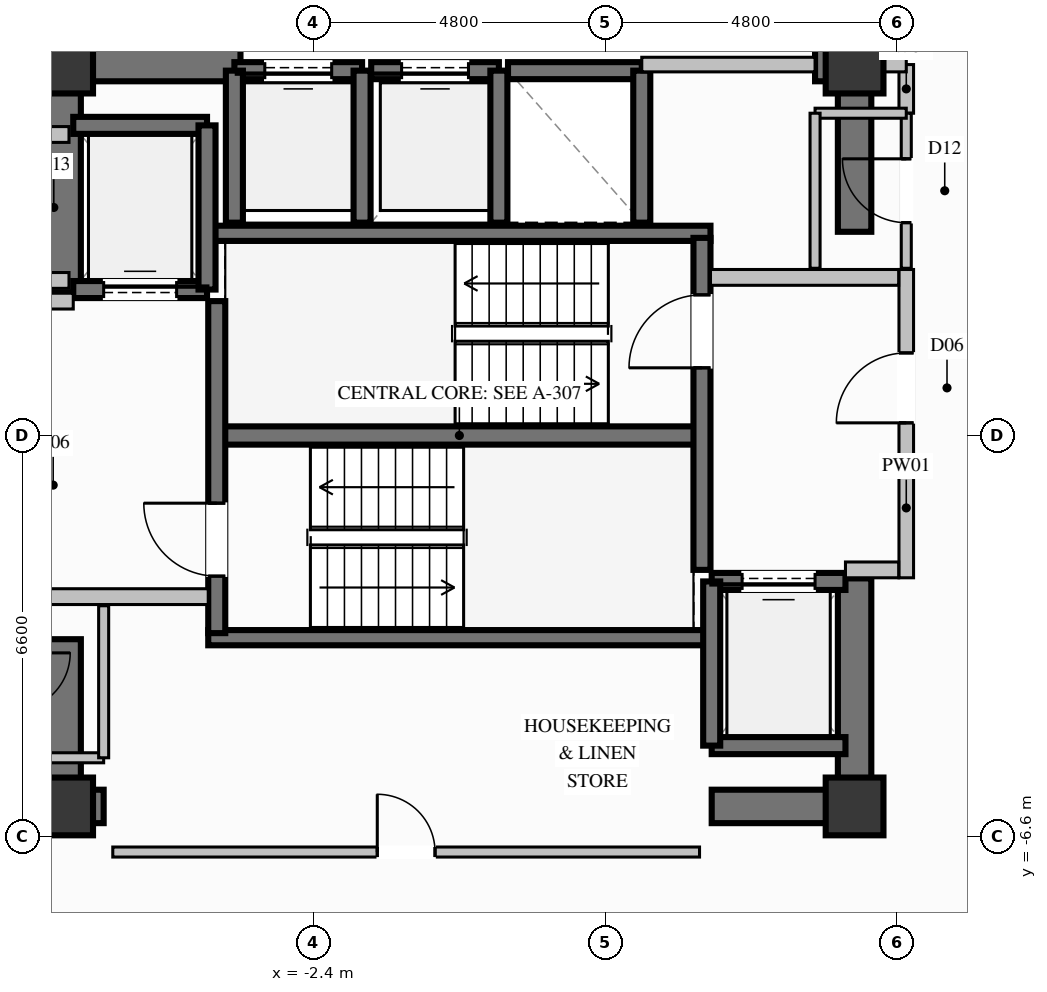
"""IFC4 building model, lengths in metres.
Left out: names, types, materials, properties, quantities, classifications, styles, units other than length and angle.
Written with IfcOpenShell. Run it as: python <this file> out.ifc"""

import sys

from ifc_helpers import new_model, si_unit, direction, frame, frame_2d, origin, origin_2d, place, context, subcontext, project, spatial, rectangle, extrude, element, fill, save


model = new_model("IFC4")
c1 = context("Model", 3, precision=1e-05, world=origin(), true_north=direction((0.0, 1.0)))
c2 = subcontext(c1, "Body", "Model", "MODEL_VIEW")
j1 = project(units=[si_unit("LENGTHUNIT", "METRE"), si_unit("PLANEANGLEUNIT", "RADIAN")], contexts=[c1])
p1 = place(None, origin())
s1 = spatial("IfcSite", under=j1, at=p1, CompositionType="ELEMENT")
p2 = place(p1, origin())
s2 = spatial("IfcBuilding", under=s1, at=p2, CompositionType="ELEMENT")
p3 = place(p2, frame((0.0, 0.0, 198.4)))
s3 = spatial("IfcBuildingStorey", under=s2, at=p3, CompositionType="ELEMENT", Elevation=198.4)
for number, where, z_axis, x_axis in (
    (1, (-6.5, -6.1, 0.0), (0.0, 0.0, 1.0), (1.0, 0.0, 0.0)),
    (2, (6.5, -6.1, 0.0), (0.0, 0.0, 1.0), (1.0, 0.0, 0.0)),
    (3, (6.5, 6.1, 0.0), (0.0, 0.0, 1.0), (1.0, 0.0, 0.0)),
    (4, (-6.5, 6.1, 0.0), (0.0, 0.0, 1.0), (1.0, 0.0, 0.0)),
):
    element("IfcColumn", number, at=place(p3, frame(where, z_axis=z_axis, x_axis=x_axis)), inside=s3, PredefinedType="COLUMN", context=c2, shape_type="SweptSolid", body=[
        extrude(rectangle(XDim=0.95, YDim=0.95, at=origin_2d()), origin(), (0.0, 0.0, 1.0), 3.6),
    ])
p4 = place(p3, frame((-3.99, 0.0, 0.0), z_axis=(0.0, 0.0, 1.0), x_axis=(1.0, 0.0, 0.0)))
e5 = element("IfcWall", 5, at=p4, inside=s3, PredefinedType="SHEAR", context=c2, shape_type="SweptSolid", body=[
    extrude(rectangle(XDim=7.98, YDim=0.3, at=frame_2d((3.99, 0.0))), origin(), (0.0, 0.0, 1.0), 3.6),
])
for number, where, z_axis, x_axis in (
    (6, (-4.13, -3.325, 0.0), (0.0, 0.0, 1.0), (1.0, 0.0, 0.0)),
    (7, (-4.13, 3.325, 0.0), (0.0, 0.0, 1.0), (1.0, 0.0, 0.0)),
):
    element("IfcWall", number, at=place(p3, frame(where, z_axis=z_axis, x_axis=x_axis)), inside=s3, PredefinedType="SOLIDWALL", context=c2, shape_type="SweptSolid", body=[
        extrude(rectangle(XDim=8.26, YDim=0.25, at=frame_2d((4.13, 0.0))), origin(), (0.0, 0.0, 1.0), 3.6),
    ])
p5 = place(p3, frame((-6.225, -6.1, 0.0), z_axis=(0.0, 0.0, 1.0), x_axis=(1.0, 0.0, 0.0)))
e8 = element("IfcWall", 8, at=p5, inside=s3, PredefinedType="SHEAR", context=c2, shape_type="SweptSolid", body=[
    extrude(rectangle(XDim=0.375, YDim=0.55, at=frame_2d((0.188, 0.0))), origin(), (0.0, 0.0, 1.0), 3.6),
])
p6 = place(p3, frame((4.15, -6.1, 0.0), z_axis=(0.0, 0.0, 1.0), x_axis=(1.0, 0.0, 0.0)))
e9 = element("IfcWall", 9, at=p6, inside=s3, PredefinedType="SHEAR", context=c2, shape_type="SweptSolid", body=[
    extrude(rectangle(XDim=2.075, YDim=0.55, at=frame_2d((1.038, 0.0))), origin(), (0.0, 0.0, 1.0), 3.6),
])
p7 = place(p3, frame((-6.225, 6.1, 0.0), z_axis=(0.0, 0.0, 1.0), x_axis=(1.0, 0.0, 0.0)))
e10 = element("IfcWall", 10, at=p7, inside=s3, PredefinedType="SHEAR", context=c2, shape_type="SweptSolid", body=[
    extrude(rectangle(XDim=2.625, YDim=0.55, at=frame_2d((1.312, 0.0))), origin(), (0.0, 0.0, 1.0), 3.6),
])
p8 = place(p3, frame((5.85, 6.1, 0.0), z_axis=(0.0, 0.0, 1.0), x_axis=(1.0, 0.0, 0.0)))
e11 = element("IfcWall", 11, at=p8, inside=s3, PredefinedType="SHEAR", context=c2, shape_type="SweptSolid", body=[
    extrude(rectangle(XDim=0.375, YDim=0.55, at=frame_2d((0.188, 0.0))), origin(), (0.0, 0.0, 1.0), 3.6),
])
p9 = place(p3, frame((-6.5, 2.35, 0.0), z_axis=(0.0, 0.0, 1.0), x_axis=(0.0, 1.0, 0.0)))
e12 = element("IfcWall", 12, at=p9, inside=s3, PredefinedType="SHEAR", context=c2, shape_type="SweptSolid", body=[
    extrude(rectangle(XDim=4.025, YDim=0.55, at=frame_2d((2.012, 0.0))), origin(), (0.0, 0.0, 1.0), 3.6),
])
p10 = place(p3, frame((-6.5, -6.375, 0.0), z_axis=(0.0, 0.0, 1.0), x_axis=(0.0, 1.0, 0.0)))
e13 = element("IfcWall", 13, at=p10, inside=s3, PredefinedType="SHEAR", context=c2, shape_type="SweptSolid", body=[
    extrude(rectangle(XDim=3.025, YDim=0.55, at=frame_2d((1.512, 0.0))), origin(), (0.0, 0.0, 1.0), 3.6),
])
p11 = place(p3, frame((6.5, -6.375, 0.0), z_axis=(0.0, 0.0, 1.0), x_axis=(0.0, 1.0, 0.0)))
e14 = element("IfcWall", 14, at=p11, inside=s3, PredefinedType="SHEAR", context=c2, shape_type="SweptSolid", body=[
    extrude(rectangle(XDim=4.025, YDim=0.55, at=frame_2d((2.012, 0.0))), origin(), (0.0, 0.0, 1.0), 3.6),
])
p12 = place(p3, frame((6.5, 3.35, 0.0), z_axis=(0.0, 0.0, 1.0), x_axis=(0.0, 1.0, 0.0)))
e15 = element("IfcWall", 15, at=p12, inside=s3, PredefinedType="SHEAR", context=c2, shape_type="SweptSolid", body=[
    extrude(rectangle(XDim=3.025, YDim=0.55, at=frame_2d((1.512, 0.0))), origin(), (0.0, 0.0, 1.0), 3.6),
])
p13 = place(p3, frame((-1.6, 6.0, 0.0), z_axis=(0.0, 0.0, 1.0), x_axis=(-1.0, 0.0, 0.0)))
e16 = element("IfcWall", 16, at=p13, inside=s3, PredefinedType="SOLIDWALL", context=c2, shape_type="SweptSolid", body=[
    extrude(rectangle(XDim=2.1, YDim=0.28, at=frame_2d((1.05, 0.0))), origin(), (0.0, 0.0, 1.0), 3.36),
])
p14 = place(p13, frame((0.5, 0.0, 0.0)))
e17 = element("IfcOpeningElement", 17, at=p14, cuts=e16, PredefinedType="OPENING", context=c2, shape_type="SweptSolid", body=[
    extrude(rectangle(XDim=1.1, YDim=2.2, at=frame_2d((0.55, 1.1))), frame((0.0, 0.15, 0.0), z_axis=(0.0, -1.0, 0.0), x_axis=(1.0, 0.0, 0.0)), (0.0, 0.0, 1.0), 0.3),
])
for number, where, z_axis, x_axis in (
    (18, (-3.7, 6.0, 0.0), (0.0, 0.0, 1.0), (0.0, -1.0, 0.0)),
    (19, (-1.6, 3.5, 0.0), (0.0, 0.0, 1.0), (0.0, 1.0, 0.0)),
):
    element("IfcWall", number, at=place(p3, frame(where, z_axis=z_axis, x_axis=x_axis)), inside=s3, PredefinedType="SOLIDWALL", context=c2, shape_type="SweptSolid", body=[
        extrude(rectangle(XDim=2.5, YDim=0.28, at=frame_2d((1.25, 0.0))), origin(), (0.0, 0.0, 1.0), 3.36),
    ])
p15 = place(p3, frame((0.65, 6.0, 0.0), z_axis=(0.0, 0.0, 1.0), x_axis=(-1.0, 0.0, 0.0)))
e20 = element("IfcWall", 20, at=p15, inside=s3, PredefinedType="SOLIDWALL", context=c2, shape_type="SweptSolid", body=[
    extrude(rectangle(XDim=2.1, YDim=0.28, at=frame_2d((1.05, 0.0))), origin(), (0.0, 0.0, 1.0), 3.36),
])
p16 = place(p15, frame((0.5, 0.0, 0.0)))
e21 = element("IfcOpeningElement", 21, at=p16, cuts=e20, PredefinedType="OPENING", context=c2, shape_type="SweptSolid", body=[
    extrude(rectangle(XDim=1.1, YDim=2.2, at=frame_2d((0.55, 1.1))), frame((0.0, 0.15, 0.0), z_axis=(0.0, -1.0, 0.0), x_axis=(1.0, 0.0, 0.0)), (0.0, 0.0, 1.0), 0.3),
])
p17 = place(p3, frame((0.65, 3.5, 0.0), z_axis=(0.0, 0.0, 1.0), x_axis=(0.0, 1.0, 0.0)))
e22 = element("IfcWall", 22, at=p17, inside=s3, PredefinedType="SOLIDWALL", context=c2, shape_type="SweptSolid", body=[
    extrude(rectangle(XDim=2.5, YDim=0.28, at=frame_2d((1.25, 0.0))), origin(), (0.0, 0.0, 1.0), 3.36),
])
p18 = place(p3, frame((3.0, 6.0, 0.0), z_axis=(0.0, 0.0, 1.0), x_axis=(-1.0, 0.0, 0.0)))
e23 = element("IfcWall", 23, at=p18, inside=s3, PredefinedType="SOLIDWALL", context=c2, shape_type="SweptSolid", body=[
    extrude(rectangle(XDim=2.2, YDim=0.28, at=frame_2d((1.1, 0.0))), origin(), (0.0, 0.0, 1.0), 3.36),
])
p19 = place(p3, frame((3.0, 3.5, 0.0), z_axis=(0.0, 0.0, 1.0), x_axis=(0.0, 1.0, 0.0)))
e24 = element("IfcWall", 24, at=p19, inside=s3, PredefinedType="SOLIDWALL", context=c2, shape_type="SweptSolid", body=[
    extrude(rectangle(XDim=2.5, YDim=0.28, at=frame_2d((1.25, 0.0))), origin(), (0.0, 0.0, 1.0), 3.36),
])
p20 = place(p3, frame((-6.35, 2.4, 0.0), z_axis=(0.0, 0.0, 1.0), x_axis=(1.0, 0.0, 0.0)))
e25 = element("IfcWall", 25, at=p20, inside=s3, PredefinedType="SOLIDWALL", context=c2, shape_type="SweptSolid", body=[
    extrude(rectangle(XDim=2.2, YDim=0.28, at=frame_2d((1.1, 0.0))), origin(), (0.0, 0.0, 1.0), 3.36),
])
p21 = place(p20, frame((0.5, 0.0, 0.0)))
e26 = element("IfcOpeningElement", 26, at=p21, cuts=e25, PredefinedType="OPENING", context=c2, shape_type="SweptSolid", body=[
    extrude(rectangle(XDim=1.2, YDim=2.2, at=frame_2d((0.6, 1.1))), frame((0.0, 0.15, 0.0), z_axis=(0.0, -1.0, 0.0), x_axis=(1.0, 0.0, 0.0)), (0.0, 0.0, 1.0), 0.3),
])
p22 = place(p3, frame((-4.15, 5.1, 0.0), z_axis=(0.0, 0.0, 1.0), x_axis=(-1.0, 0.0, 0.0)))
e27 = element("IfcWall", 27, at=p22, inside=s3, PredefinedType="SOLIDWALL", context=c2, shape_type="SweptSolid", body=[
    extrude(rectangle(XDim=2.2, YDim=0.28, at=frame_2d((1.1, 0.0))), origin(), (0.0, 0.0, 1.0), 3.36),
])
p23 = place(p3, frame((-4.15, 2.4, 0.0), z_axis=(0.0, 0.0, 1.0), x_axis=(0.0, 1.0, 0.0)))
e28 = element("IfcWall", 28, at=p23, inside=s3, PredefinedType="SOLIDWALL", context=c2, shape_type="SweptSolid", body=[
    extrude(rectangle(XDim=2.7, YDim=0.28, at=frame_2d((1.35, 0.0))), origin(), (0.0, 0.0, 1.0), 3.36),
])
p24 = place(p3, frame((4.15, -5.1, 0.0), z_axis=(0.0, 0.0, 1.0), x_axis=(1.0, 0.0, 0.0)))
e29 = element("IfcWall", 29, at=p24, inside=s3, PredefinedType="SOLIDWALL", context=c2, shape_type="SweptSolid", body=[
    extrude(rectangle(XDim=2.2, YDim=0.28, at=frame_2d((1.1, 0.0))), origin(), (0.0, 0.0, 1.0), 3.36),
])
p25 = place(p3, frame((6.35, -2.4, 0.0), z_axis=(0.0, 0.0, 1.0), x_axis=(-1.0, 0.0, 0.0)))
e30 = element("IfcWall", 30, at=p25, inside=s3, PredefinedType="SOLIDWALL", context=c2, shape_type="SweptSolid", body=[
    extrude(rectangle(XDim=2.2, YDim=0.28, at=frame_2d((1.1, 0.0))), origin(), (0.0, 0.0, 1.0), 3.36),
])
p26 = place(p25, frame((0.5, 0.0, 0.0)))
e31 = element("IfcOpeningElement", 31, at=p26, cuts=e30, PredefinedType="OPENING", context=c2, shape_type="SweptSolid", body=[
    extrude(rectangle(XDim=1.2, YDim=2.2, at=frame_2d((0.6, 1.1))), frame((0.0, 0.15, 0.0), z_axis=(0.0, -1.0, 0.0), x_axis=(1.0, 0.0, 0.0)), (0.0, 0.0, 1.0), 0.3),
])
p27 = place(p3, frame((4.15, -2.4, 0.0), z_axis=(0.0, 0.0, 1.0), x_axis=(0.0, -1.0, 0.0)))
e32 = element("IfcWall", 32, at=p27, inside=s3, PredefinedType="SOLIDWALL", context=c2, shape_type="SweptSolid", body=[
    extrude(rectangle(XDim=2.7, YDim=0.28, at=frame_2d((1.35, 0.0))), origin(), (0.0, 0.0, 1.0), 3.36),
])
p28 = place(p3, frame((-3.99, -3.25, 0.0), z_axis=(0.0, 0.0, 1.0), x_axis=(0.0, 1.0, 0.0)))
e33 = element("IfcWall", 33, at=p28, inside=s3, PredefinedType="SOLIDWALL", context=c2, shape_type="SweptSolid", body=[
    extrude(rectangle(XDim=5.46, YDim=0.28, at=frame_2d((2.73, 0.0))), origin(), (0.0, 0.0, 1.0), 3.36),
])
p29 = place(p28, frame((0.937, 0.0, 0.0)))
e34 = element("IfcOpeningElement", 34, at=p29, cuts=e33, PredefinedType="OPENING", context=c2, shape_type="SweptSolid", body=[
    extrude(rectangle(XDim=1.2, YDim=2.2, at=frame_2d((0.6, 1.1))), frame((0.0, 0.15, 0.0), z_axis=(0.0, -1.0, 0.0), x_axis=(1.0, 0.0, 0.0)), (0.0, 0.0, 1.0), 0.3),
])
p30 = place(p3, frame((3.99, -2.21, 0.0), z_axis=(0.0, 0.0, 1.0), x_axis=(0.0, 1.0, 0.0)))
e35 = element("IfcWall", 35, at=p30, inside=s3, PredefinedType="SOLIDWALL", context=c2, shape_type="SweptSolid", body=[
    extrude(rectangle(XDim=5.46, YDim=0.28, at=frame_2d((2.73, 0.0))), origin(), (0.0, 0.0, 1.0), 3.36),
])
p31 = place(p30, frame((3.323, 0.0, 0.0)))
e36 = element("IfcOpeningElement", 36, at=p31, cuts=e35, PredefinedType="OPENING", context=c2, shape_type="SweptSolid", body=[
    extrude(rectangle(XDim=1.2, YDim=2.2, at=frame_2d((0.6, 1.1))), frame((0.0, 0.15, 0.0), z_axis=(0.0, -1.0, 0.0), x_axis=(1.0, 0.0, 0.0)), (0.0, 0.0, 1.0), 0.3),
])
p32 = place(p3, frame((-7.225, -2.65, 0.0), z_axis=(0.0, 0.0, 1.0), x_axis=(1.0, 0.0, 0.0)))
e37 = element("IfcWall", 37, at=p32, inside=s3, PredefinedType="PARTITIONING", context=c2, shape_type="SweptSolid", body=[
    extrude(rectangle(XDim=3.095, YDim=0.26, at=frame_2d((1.548, 0.0))), origin(), (0.0, 0.0, 1.0), 3.36),
])
p33 = place(p3, frame((-7.225, 2.21, 0.0), z_axis=(0.0, 0.0, 1.0), x_axis=(1.0, 0.0, 0.0)))
e38 = element("IfcWall", 38, at=p33, inside=s3, PredefinedType="PARTITIONING", context=c2, shape_type="SweptSolid", body=[
    extrude(rectangle(XDim=0.875, YDim=0.26, at=frame_2d((0.438, 0.0))), origin(), (0.0, 0.0, 1.0), 3.36),
])
p34 = place(p3, frame((7.35, -2.34, 0.0), z_axis=(0.0, 0.0, 1.0), x_axis=(0.0, 1.0, 0.0)))
e39 = element("IfcWall", 39, at=p34, inside=s3, PredefinedType="PARTITIONING", context=c2, shape_type="SweptSolid", body=[
    extrude(rectangle(XDim=5.07, YDim=0.24, at=frame_2d((2.535, 0.0))), origin(), (0.0, 0.0, 1.0), 2.445),
])
p35 = place(p34, frame((2.548, 0.0, 0.0)))
e40 = element("IfcOpeningElement", 40, at=p35, cuts=e39, PredefinedType="OPENING", context=c2, shape_type="SweptSolid", body=[
    extrude(rectangle(XDim=1.15, YDim=2.2, at=frame_2d((0.575, 1.1))), frame((0.0, 0.13, 0.0), z_axis=(0.0, -1.0, 0.0), x_axis=(1.0, 0.0, 0.0)), (0.0, 0.0, 1.0), 0.26),
])
p36 = place(p3, frame((6.35, -2.21, 0.0), z_axis=(0.0, 0.0, 1.0), x_axis=(1.0, 0.0, 0.0)))
e41 = element("IfcWall", 41, at=p36, inside=s3, PredefinedType="PARTITIONING", context=c2, shape_type="SweptSolid", body=[
    extrude(rectangle(XDim=0.875, YDim=0.26, at=frame_2d((0.438, 0.0))), origin(), (0.0, 0.0, 1.0), 3.36),
])
p37 = place(p3, frame((4.13, 2.6, 0.0), z_axis=(0.0, 0.0, 1.0), x_axis=(1.0, 0.0, 0.0)))
e42 = element("IfcWall", 42, at=p37, inside=s3, PredefinedType="PARTITIONING", context=c2, shape_type="SweptSolid", body=[
    extrude(rectangle(XDim=3.095, YDim=0.26, at=frame_2d((1.548, 0.0))), origin(), (0.0, 0.0, 1.0), 3.36),
])
for number, where, z_axis, x_axis in (
    (43, (-7.35, 4.95, 0.0), (0.0, 0.0, 1.0), (1.0, 0.0, 0.0)),
    (44, (-7.35, 2.55, 0.0), (0.0, 0.0, 1.0), (1.0, 0.0, 0.0)),
):
    element("IfcWall", number, at=place(p3, frame(where, z_axis=z_axis, x_axis=x_axis)), inside=s3, PredefinedType="PARTITIONING", context=c2, shape_type="SweptSolid", body=[
        extrude(rectangle(XDim=0.93, YDim=0.26, at=frame_2d((0.465, 0.0))), origin(), (0.0, 0.0, 1.0), 3.36),
    ])
p38 = place(p3, frame((3.0, 6.1, 0.0), z_axis=(0.0, 0.0, 1.0), x_axis=(1.0, 0.0, 0.0)))
e45 = element("IfcWall", 45, at=p38, inside=s3, PredefinedType="PARTITIONING", context=c2, shape_type="SweptSolid", body=[
    extrude(rectangle(XDim=2.85, YDim=0.24, at=frame_2d((1.425, 0.0))), origin(), (0.0, 0.0, 1.0), 2.445),
])
p39 = place(p3, frame((7.35, 5.3, 0.0), z_axis=(0.0, 0.0, 1.0), x_axis=(0.0, 1.0, 0.0)))
e46 = element("IfcWall", 46, at=p39, inside=s3, PredefinedType="PARTITIONING", context=c2, shape_type="SweptSolid", body=[
    extrude(rectangle(XDim=0.8, YDim=0.24, at=frame_2d((0.4, 0.0))), origin(), (0.0, 0.0, 1.0), 2.445),
])
for number, where, z_axis, x_axis in (
    (47, (6.5, 6.1, 0.0), (0.0, 0.0, 1.0), (1.0, 0.0, 0.0)),
    (48, (-7.35, 6.1, 0.0), (0.0, 0.0, 1.0), (1.0, 0.0, 0.0)),
):
    element("IfcWall", number, at=place(p3, frame(where, z_axis=z_axis, x_axis=x_axis)), inside=s3, PredefinedType="PARTITIONING", context=c2, shape_type="SweptSolid", body=[
        extrude(rectangle(XDim=0.85, YDim=0.24, at=frame_2d((0.425, 0.0))), origin(), (0.0, 0.0, 1.0), 2.876),
    ])
p40 = place(p3, frame((-7.35, -5.3, 0.0), z_axis=(0.0, 0.0, 1.0), x_axis=(1.0, 0.0, 0.0)))
e49 = element("IfcWall", 49, at=p40, inside=s3, PredefinedType="PARTITIONING", context=c2, shape_type="SweptSolid", body=[
    extrude(rectangle(XDim=1.5, YDim=0.165, at=frame_2d((0.75, 0.0))), origin(), (0.0, 0.0, 1.0), 2.445),
])
p41 = place(p3, frame((-5.85, -5.3, 0.0), z_axis=(0.0, 0.0, 1.0), x_axis=(0.0, 1.0, 0.0)))
e50 = element("IfcWall", 50, at=p41, inside=s3, PredefinedType="PARTITIONING", context=c2, shape_type="SweptSolid", body=[
    extrude(rectangle(XDim=2.5, YDim=0.165, at=frame_2d((1.25, 0.0))), origin(), (0.0, 0.0, 1.0), 2.445),
])
p42 = place(p3, frame((7.35, 2.75, 0.0), z_axis=(0.0, 0.0, 1.0), x_axis=(0.0, 1.0, 0.0)))
e51 = element("IfcWall", 51, at=p42, inside=s3, PredefinedType="PARTITIONING", context=c2, shape_type="SweptSolid", body=[
    extrude(rectangle(XDim=2.55, YDim=0.165, at=frame_2d((1.275, 0.0))), origin(), (0.0, 0.0, 1.0), 3.36),
])
p43 = place(p42, frame((0.75, 0.0, 0.0)))
e52 = element("IfcOpeningElement", 52, at=p43, cuts=e51, PredefinedType="OPENING", context=c2, shape_type="SweptSolid", body=[
    extrude(rectangle(XDim=1.05, YDim=2.15, at=frame_2d((0.525, 1.075))), frame((0.0, 0.093, 0.0), z_axis=(0.0, -1.0, 0.0), x_axis=(1.0, 0.0, 0.0)), (0.0, 0.0, 1.0), 0.185),
])
p44 = place(p3, frame((7.35, 5.3, 0.0), z_axis=(0.0, 0.0, 1.0), x_axis=(-1.0, 0.0, 0.0)))
e53 = element("IfcWall", 53, at=p44, inside=s3, PredefinedType="PARTITIONING", context=c2, shape_type="SweptSolid", body=[
    extrude(rectangle(XDim=1.5, YDim=0.165, at=frame_2d((0.75, 0.0))), origin(), (0.0, 0.0, 1.0), 2.445),
])
p45 = place(p3, frame((5.85, 5.3, 0.0), z_axis=(0.0, 0.0, 1.0), x_axis=(0.0, -1.0, 0.0)))
e54 = element("IfcWall", 54, at=p45, inside=s3, PredefinedType="PARTITIONING", context=c2, shape_type="SweptSolid", body=[
    extrude(rectangle(XDim=2.55, YDim=0.165, at=frame_2d((1.275, 0.0))), origin(), (0.0, 0.0, 1.0), 2.445),
])
p46 = place(p3, frame((-5.7, -6.85, 0.0), z_axis=(0.0, 0.0, 1.0), x_axis=(1.0, 0.0, 0.0)))
e55 = element("IfcWall", 55, at=p46, inside=s3, PredefinedType="PARTITIONING", context=c2, shape_type="SweptSolid", body=[
    extrude(rectangle(XDim=9.65, YDim=0.165, at=frame_2d((4.825, 0.0))), origin(), (0.0, 0.0, 1.0), 2.445),
])
p47 = place(p46, frame((4.35, 0.0, 0.0)))
e56 = element("IfcOpeningElement", 56, at=p47, cuts=e55, PredefinedType="OPENING", context=c2, shape_type="SweptSolid", body=[
    extrude(rectangle(XDim=0.95, YDim=2.1, at=frame_2d((0.475, 1.05))), frame((0.0, 0.093, 0.0), z_axis=(0.0, -1.0, 0.0), x_axis=(1.0, 0.0, 0.0)), (0.0, 0.0, 1.0), 0.185),
])
p48 = place(p14, origin())
e57 = element("IfcDoor", 57, at=p48, inside=s3, OperationType="SLIDING_TO_LEFT", PredefinedType="DOOR", context=c2, shape_type="SweptSolid", body=[
    extrude(rectangle(XDim=1.1, YDim=2.2, at=frame_2d((0.55, 1.1))), frame((0.0, 0.025, 0.0), z_axis=(0.0, -1.0, 0.0), x_axis=(1.0, 0.0, 0.0)), (0.0, 0.0, 1.0), 0.05),
])
fill(e17, e57)
p49 = place(p16, origin())
e58 = element("IfcDoor", 58, at=p49, inside=s3, OperationType="SLIDING_TO_LEFT", PredefinedType="DOOR", context=c2, shape_type="SweptSolid", body=[
    extrude(rectangle(XDim=1.1, YDim=2.2, at=frame_2d((0.55, 1.1))), frame((0.0, 0.025, 0.0), z_axis=(0.0, -1.0, 0.0), x_axis=(1.0, 0.0, 0.0)), (0.0, 0.0, 1.0), 0.05),
])
fill(e21, e58)
p50 = place(p21, origin())
e59 = element("IfcDoor", 59, at=p50, inside=s3, OperationType="SLIDING_TO_LEFT", PredefinedType="DOOR", context=c2, shape_type="SweptSolid", body=[
    extrude(rectangle(XDim=1.2, YDim=2.2, at=frame_2d((0.6, 1.1))), frame((0.0, 0.025, 0.0), z_axis=(0.0, -1.0, 0.0), x_axis=(1.0, 0.0, 0.0)), (0.0, 0.0, 1.0), 0.05),
])
fill(e26, e59)
p51 = place(p26, origin())
e60 = element("IfcDoor", 60, at=p51, inside=s3, OperationType="SLIDING_TO_LEFT", PredefinedType="DOOR", context=c2, shape_type="SweptSolid", body=[
    extrude(rectangle(XDim=1.2, YDim=2.2, at=frame_2d((0.6, 1.1))), frame((0.0, 0.025, 0.0), z_axis=(0.0, -1.0, 0.0), x_axis=(1.0, 0.0, 0.0)), (0.0, 0.0, 1.0), 0.05),
])
fill(e31, e60)
p52 = place(p29, origin())
e61 = element("IfcDoor", 61, at=p52, inside=s3, OperationType="SINGLE_SWING_RIGHT", PredefinedType="DOOR", context=c2, shape_type="SweptSolid", body=[
    extrude(rectangle(XDim=1.2, YDim=2.2, at=frame_2d((0.6, 1.1))), frame((0.0, 0.025, 0.0), z_axis=(0.0, -1.0, 0.0), x_axis=(1.0, 0.0, 0.0)), (0.0, 0.0, 1.0), 0.05),
])
fill(e34, e61)
p53 = place(p31, origin())
e62 = element("IfcDoor", 62, at=p53, inside=s3, OperationType="SINGLE_SWING_LEFT", PredefinedType="DOOR", context=c2, shape_type="SweptSolid", body=[
    extrude(rectangle(XDim=1.2, YDim=2.2, at=frame_2d((0.6, 1.1))), frame((0.0, 0.025, 0.0), z_axis=(0.0, -1.0, 0.0), x_axis=(1.0, 0.0, 0.0)), (0.0, 0.0, 1.0), 0.05),
])
fill(e36, e62)
p54 = place(p35, origin())
e63 = element("IfcDoor", 63, at=p54, inside=s3, OperationType="SINGLE_SWING_LEFT", PredefinedType="DOOR", context=c2, shape_type="SweptSolid", body=[
    extrude(rectangle(XDim=1.15, YDim=2.2, at=frame_2d((0.575, 1.1))), frame((0.0, 0.025, 0.0), z_axis=(0.0, -1.0, 0.0), x_axis=(1.0, 0.0, 0.0)), (0.0, 0.0, 1.0), 0.05),
])
fill(e40, e63)
p55 = place(p43, origin())
e64 = element("IfcDoor", 64, at=p55, inside=s3, OperationType="SINGLE_SWING_RIGHT", PredefinedType="DOOR", context=c2, shape_type="SweptSolid", body=[
    extrude(rectangle(XDim=1.05, YDim=2.15, at=frame_2d((0.525, 1.075))), frame((0.0, 0.025, 0.0), z_axis=(0.0, -1.0, 0.0), x_axis=(1.0, 0.0, 0.0)), (0.0, 0.0, 1.0), 0.05),
])
fill(e52, e64)
p56 = place(p47, origin())
e65 = element("IfcDoor", 65, at=p56, inside=s3, OperationType="SINGLE_SWING_LEFT", PredefinedType="DOOR", context=c2, shape_type="SweptSolid", body=[
    extrude(rectangle(XDim=0.95, YDim=2.1, at=frame_2d((0.475, 1.05))), frame((0.0, 0.025, 0.0), z_axis=(0.0, -1.0, 0.0), x_axis=(1.0, 0.0, 0.0)), (0.0, 0.0, 1.0), 0.05),
])
fill(e56, e65)
save(model, sys.argv[1])
